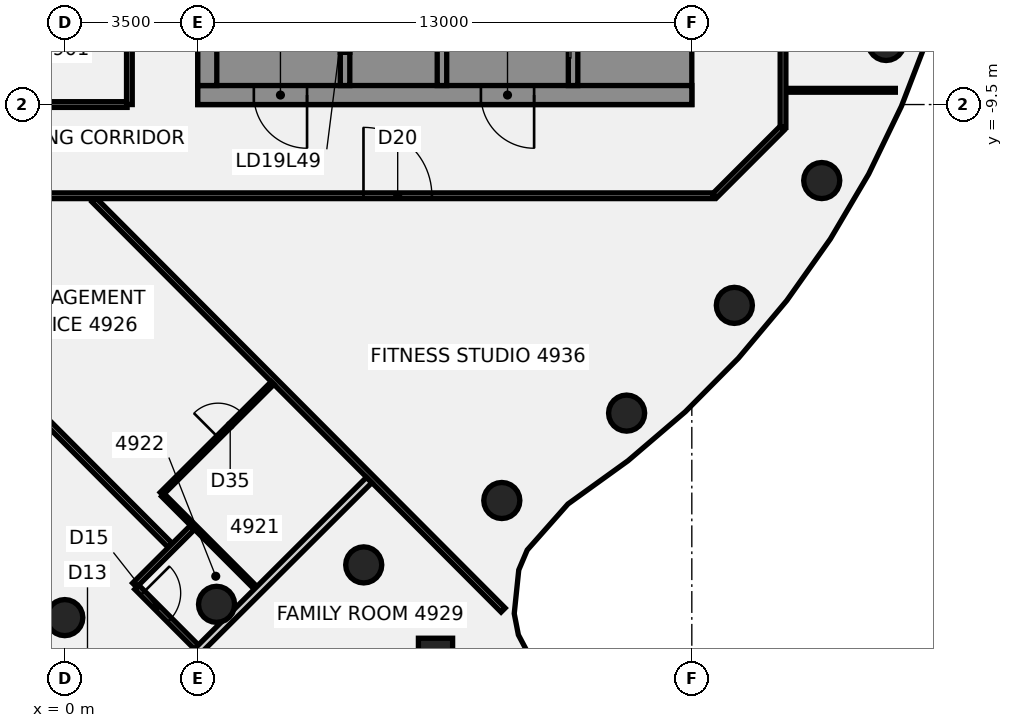
"""IFC4 building model, lengths in metres.
Left out: names, types, materials, properties, quantities, classifications, styles, units other than length and angle.
Written with IfcOpenShell. Run it as: python <this file> out.ifc"""

import sys

from ifc_helpers import new_model, si_unit, direction, frame, frame_2d, origin, origin_2d, place, context, subcontext, project, spatial, polyline, rectangle, circle, outline, extrude, element, fill, save


model = new_model("IFC4")
c1 = context("Model", 3, precision=1e-05, world=origin(), true_north=direction((0.0, 1.0)))
c2 = subcontext(c1, "Body", "Model", "MODEL_VIEW")
j1 = project(units=[si_unit("LENGTHUNIT", "METRE"), si_unit("PLANEANGLEUNIT", "RADIAN")], contexts=[c1])
p1 = place(None, origin())
s1 = spatial("IfcSite", under=j1, at=p1, CompositionType="ELEMENT")
p2 = place(p1, origin())
s2 = spatial("IfcBuilding", under=s1, at=p2, CompositionType="ELEMENT")
p3 = place(p2, frame((0.0, 0.0, 196.9)))
s3 = spatial("IfcBuildingStorey", under=s2, at=p3, CompositionType="ELEMENT", Elevation=196.9)
for number, where, z_axis, x_axis in (
    (1, (0.0, -23.0, -0.14), (0.0, 0.0, 1.0), (1.0, 0.0, 0.0)),
    (2, (3.994, -22.651, -0.14), (0.0, 0.0, 1.0), (1.0, 0.0, 0.0)),
    (3, (7.866, -21.613, -0.14), (0.0, 0.0, 1.0), (1.0, 0.0, 0.0)),
    (4, (11.5, -19.919, -0.14), (0.0, 0.0, 1.0), (1.0, 0.0, 0.0)),
    (5, (14.784, -17.619, -0.14), (0.0, 0.0, 1.0), (1.0, 0.0, 0.0)),
    (6, (17.619, -14.784, -0.14), (0.0, 0.0, 1.0), (1.0, 0.0, 0.0)),
    (7, (19.919, -11.5, -0.14), (0.0, 0.0, 1.0), (1.0, 0.0, 0.0)),
    (8, (21.613, -7.866, -0.14), (0.0, 0.0, 1.0), (1.0, 0.0, 0.0)),
):
    element("IfcColumn", number, at=place(p3, frame(where, z_axis=z_axis, x_axis=x_axis)), inside=s3, PredefinedType="COLUMN", context=c2, shape_type="SweptSolid", body=[
        extrude(circle(Radius=0.475, at=origin_2d()), origin(), (0.0, 0.0, 1.0), 3.6),
    ])
p4 = place(p3, frame((9.756, -23.992, -0.139), z_axis=(0.009624668379, 0.04947892899, 0.998728792688), x_axis=(-0.70765331906, -0.705324503584, 0.041762718624)))
e9 = element("IfcColumn", 9, at=p4, inside=s3, PredefinedType="COLUMN", context=c2, shape_type="SweptSolid", body=[
    extrude(rectangle(XDim=0.9, YDim=0.9, at=origin_2d()), origin(), (0.0, 0.0, 1.0), 3.602),
])
p5 = place(p3, frame((-6.292, -12.01, 0.0), z_axis=(0.0, 0.0, 1.0), x_axis=(0.70618374721, -0.708028611834, 0.0)))
e10 = element("IfcWall", 10, at=p5, inside=s3, PredefinedType="PARTITIONING", context=c2, shape_type="SweptSolid", body=[
    extrude(rectangle(XDim=12.836, YDim=0.15, at=frame_2d((6.418, 0.0))), origin(), (0.0, 0.0, 1.0), 2.864),
])
p6 = place(p5, frame((4.195, 0.0, 0.0)))
e11 = element("IfcOpeningElement", 11, at=p6, cuts=e10, PredefinedType="OPENING", context=c2, shape_type="SweptSolid", body=[
    extrude(rectangle(XDim=0.9, YDim=2.1, at=frame_2d((0.45, 1.05))), frame((0.0, 0.085, 0.0), z_axis=(0.0, -1.0, 0.0), x_axis=(1.0, 0.0, 0.0)), (0.0, 0.0, 1.0), 0.17),
])
p7 = place(p3, frame((0.77, -12.01, 0.0), z_axis=(0.0, 0.0, 1.0), x_axis=(0.706233281546, -0.70797920311, 0.0)))
e12 = element("IfcWall", 12, at=p7, inside=s3, PredefinedType="PARTITIONING", context=c2, shape_type="SweptSolid", body=[
    extrude(rectangle(XDim=15.242, YDim=0.15, at=frame_2d((7.621, 0.0))), origin(), (0.0, 0.0, 1.0), 2.864),
])
p8 = place(p3, frame((1.895, -22.201, 0.0), z_axis=(0.0, 0.0, 1.0), x_axis=(0.706276457416, -0.707936131088, 0.0)))
e13 = element("IfcWall", 13, at=p8, inside=s3, PredefinedType="PARTITIONING", context=c2, shape_type="SweptSolid", body=[
    extrude(rectangle(XDim=15.74, YDim=0.15, at=frame_2d((7.87, 0.0))), origin(), (0.0, 0.0, 1.0), 2.864),
])
p9 = place(p8, frame((0.22, 0.0, 0.0)))
e14 = element("IfcOpeningElement", 14, at=p9, cuts=e13, PredefinedType="OPENING", context=c2, shape_type="SweptSolid", body=[
    extrude(rectangle(XDim=1.0, YDim=2.1, at=frame_2d((0.5, 1.05))), frame((0.0, 0.085, 0.0), z_axis=(0.0, -1.0, 0.0), x_axis=(1.0, 0.0, 0.0)), (0.0, 0.0, 1.0), 0.17),
])
p10 = place(p8, frame((6.22, 0.0, 0.0)))
e15 = element("IfcOpeningElement", 15, at=p10, cuts=e13, PredefinedType="OPENING", context=c2, shape_type="SweptSolid", body=[
    extrude(rectangle(XDim=0.9, YDim=2.1, at=frame_2d((0.45, 1.05))), frame((0.0, 0.085, 0.0), z_axis=(0.0, -1.0, 0.0), x_axis=(1.0, 0.0, 0.0)), (0.0, 0.0, 1.0), 0.17),
])
p11 = place(p8, frame((14.271, 0.0, 0.0)))
e16 = element("IfcOpeningElement", 16, at=p11, cuts=e13, PredefinedType="OPENING", context=c2, shape_type="SweptSolid", body=[
    extrude(rectangle(XDim=0.9, YDim=2.1, at=frame_2d((0.45, 1.05))), frame((0.0, 0.085, 0.0), z_axis=(0.0, -1.0, 0.0), x_axis=(1.0, 0.0, 0.0)), (0.0, 0.0, 1.0), 0.17),
])
p12 = place(p3, frame((2.583, -19.776, 0.0), z_axis=(0.0, 0.0, 1.0), x_axis=(0.706682050028, -0.707531257379, 0.0)))
e17 = element("IfcWall", 17, at=p12, inside=s3, PredefinedType="PARTITIONING", context=c2, shape_type="SweptSolid", body=[
    extrude(rectangle(XDim=3.45, YDim=0.1, at=frame_2d((1.725, 0.0))), origin(), (0.0, 0.0, 1.0), 2.864),
])
p13 = place(p3, frame((-17.1, -11.9, 0.0), z_axis=(0.0, 0.0, 1.0), x_axis=(1.0, 0.0, 0.0)))
e18 = element("IfcWall", 18, at=p13, inside=s3, PredefinedType="PARTITIONING", context=c2, shape_type="SweptSolid", body=[
    extrude(rectangle(XDim=34.165, YDim=0.15, at=frame_2d((17.083, 0.0))), origin(), (0.0, 0.0, 1.0), 2.864),
])
p14 = place(p13, frame((8.152, 0.0, 0.0)))
e19 = element("IfcOpeningElement", 19, at=p14, cuts=e18, PredefinedType="OPENING", context=c2, shape_type="SweptSolid", body=[
    extrude(rectangle(XDim=1.8, YDim=2.1, at=frame_2d((0.9, 1.05))), frame((0.0, 0.085, 0.0), z_axis=(0.0, -1.0, 0.0), x_axis=(1.0, 0.0, 0.0)), (0.0, 0.0, 1.0), 0.17),
])
p15 = place(p13, frame((2.1, 0.0, 0.0)))
e20 = element("IfcOpeningElement", 20, at=p15, cuts=e18, PredefinedType="OPENING", context=c2, shape_type="SweptSolid", body=[
    extrude(rectangle(XDim=1.8, YDim=2.1, at=frame_2d((0.9, 1.05))), frame((0.0, 0.085, 0.0), z_axis=(0.0, -1.0, 0.0), x_axis=(1.0, 0.0, 0.0)), (0.0, 0.0, 1.0), 0.17),
])
p16 = place(p13, frame((24.96, 0.0, 0.0)))
e21 = element("IfcOpeningElement", 21, at=p16, cuts=e18, PredefinedType="OPENING", context=c2, shape_type="SweptSolid", body=[
    extrude(rectangle(XDim=1.8, YDim=2.1, at=frame_2d((0.9, 1.05))), frame((0.0, 0.085, 0.0), z_axis=(0.0, -1.0, 0.0), x_axis=(1.0, 0.0, 0.0)), (0.0, 0.0, 1.0), 0.17),
])
p17 = place(p3, frame((-1.64, -9.5, 0.0), z_axis=(0.0, 0.0, 1.0), x_axis=(1.0, 0.0, 0.0)))
e22 = element("IfcWall", 22, at=p17, inside=s3, PredefinedType="PARTITIONING", context=c2, shape_type="SweptSolid", body=[
    extrude(rectangle(XDim=3.28, YDim=0.15, at=frame_2d((1.64, 0.0))), origin(), (0.0, 0.0, 1.0), 2.864),
])
p18 = place(p3, frame((18.955, -9.125, 0.0), z_axis=(0.0, 0.0, 1.0), x_axis=(1.0, 0.0, 0.0)))
e23 = element("IfcWall", 23, at=p18, inside=s3, PredefinedType="PARTITIONING", context=c2, shape_type="SweptSolid", body=[
    extrude(rectangle(XDim=2.9, YDim=0.1, at=frame_2d((1.45, 0.0))), origin(), (0.0, 0.0, 1.0), 2.864),
])
p19 = place(p3, frame((2.548, -19.74, 0.0), z_axis=(0.0, 0.0, 1.0), x_axis=(0.707934704976, 0.706277886877, 0.0)))
e24 = element("IfcWall", 24, at=p19, inside=s3, PredefinedType="PARTITIONING", context=c2, shape_type="SweptSolid", body=[
    extrude(rectangle(XDim=4.126, YDim=0.1, at=frame_2d((2.063, 0.0))), origin(), (0.0, 0.0, 1.0), 2.864),
])
p20 = place(p19, frame((2.1, 0.0, 0.0)))
e25 = element("IfcOpeningElement", 25, at=p20, cuts=e24, PredefinedType="OPENING", context=c2, shape_type="SweptSolid", body=[
    extrude(rectangle(XDim=0.9, YDim=2.1, at=frame_2d((0.45, 1.05))), frame((0.0, 0.06, 0.0), z_axis=(0.0, -1.0, 0.0), x_axis=(1.0, 0.0, 0.0)), (0.0, 0.0, 1.0), 0.12),
])
p21 = place(p3, frame((-1.989, -29.351, 0.0), z_axis=(0.0, 0.0, 1.0), x_axis=(0.708014019558, 0.706198377305, 0.0)))
e26 = element("IfcWall", 26, at=p21, inside=s3, PredefinedType="PARTITIONING", context=c2, shape_type="SweptSolid", body=[
    extrude(rectangle(XDim=14.119, YDim=0.2, at=frame_2d((7.06, 0.0))), origin(), (0.0, 0.0, 1.0), 2.864),
])
p22 = place(p21, frame((5.699, 0.0, 0.0)))
e27 = element("IfcOpeningElement", 27, at=p22, cuts=e26, PredefinedType="OPENING", context=c2, shape_type="SweptSolid", body=[
    extrude(rectangle(XDim=1.4, YDim=2.1, at=frame_2d((0.7, 1.05))), frame((0.0, 0.11, 0.0), z_axis=(0.0, -1.0, 0.0), x_axis=(1.0, 0.0, 0.0)), (0.0, 0.0, 1.0), 0.22),
])
p23 = place(p21, frame((1.579, 0.0, 0.0)))
e28 = element("IfcOpeningElement", 28, at=p23, cuts=e26, PredefinedType="OPENING", context=c2, shape_type="SweptSolid", body=[
    extrude(rectangle(XDim=0.9, YDim=2.1, at=frame_2d((0.45, 1.05))), frame((0.0, 0.11, 0.0), z_axis=(0.0, -1.0, 0.0), x_axis=(1.0, 0.0, 0.0)), (0.0, 0.0, 1.0), 0.22),
])
p24 = place(p3, frame((1.839, -22.145, 0.0), z_axis=(0.0, 0.0, 1.0), x_axis=(0.708189507156, 0.706022394797, 0.0)))
e29 = element("IfcWall", 29, at=p24, inside=s3, PredefinedType="PARTITIONING", context=c2, shape_type="SweptSolid", body=[
    extrude(rectangle(XDim=2.14, YDim=0.15, at=frame_2d((1.07, 0.0))), origin(), (0.0, 0.0, 1.0), 2.864),
])
p25 = place(p3, frame((17.1, -11.9, 0.0), z_axis=(0.0, 0.0, 1.0), x_axis=(0.707106781187, 0.707106781187, 0.0)))
e30 = element("IfcWall", 30, at=p25, inside=s3, PredefinedType="PARTITIONING", context=c2, shape_type="SweptSolid", body=[
    extrude(rectangle(XDim=2.505, YDim=0.15, at=frame_2d((1.253, 0.0))), origin(), (0.0, 0.0, 1.0), 2.864),
])
p26 = place(p3, frame((1.7, -9.5, 0.0), z_axis=(0.0, 0.0, 1.0), x_axis=(0.0, 1.0, 0.0)))
e31 = element("IfcWall", 31, at=p26, inside=s3, PredefinedType="PARTITIONING", context=c2, shape_type="SweptSolid", body=[
    extrude(rectangle(XDim=19.0, YDim=0.15, at=frame_2d((9.5, 0.0))), origin(), (0.0, 0.0, 1.0), 2.864),
])
p27 = place(p3, frame((18.9, -10.1, 0.0), z_axis=(0.0, 0.0, 1.0), x_axis=(0.0, 1.0, 0.0)))
e32 = element("IfcWall", 32, at=p27, inside=s3, PredefinedType="PARTITIONING", context=c2, shape_type="SweptSolid", body=[
    extrude(rectangle(XDim=20.82, YDim=0.15, at=frame_2d((10.41, 0.0))), origin(), (0.0, 0.0, 1.0), 2.864),
])
p28 = place(p27, frame((18.72, 0.0, 0.0)))
e33 = element("IfcOpeningElement", 33, at=p28, cuts=e32, PredefinedType="OPENING", context=c2, shape_type="SweptSolid", body=[
    extrude(rectangle(XDim=0.9, YDim=2.1, at=frame_2d((0.45, 1.05))), frame((0.0, 0.085, 0.0), z_axis=(0.0, -1.0, 0.0), x_axis=(1.0, 0.0, 0.0)), (0.0, 0.0, 1.0), 0.17),
])
p29 = place(p27, frame((10.725, 0.0, 0.0)))
e34 = element("IfcOpeningElement", 34, at=p29, cuts=e32, PredefinedType="OPENING", context=c2, shape_type="SweptSolid", body=[
    extrude(rectangle(XDim=1.8, YDim=2.1, at=frame_2d((0.9, 1.05))), frame((0.0, 0.085, 0.0), z_axis=(0.0, -1.0, 0.0), x_axis=(1.0, 0.0, 0.0)), (0.0, 0.0, 1.0), 0.17),
])
p30 = place(p27, frame((6.975, 0.0, 0.0)))
e35 = element("IfcOpeningElement", 35, at=p30, cuts=e32, PredefinedType="OPENING", context=c2, shape_type="SweptSolid", body=[
    extrude(rectangle(XDim=1.8, YDim=2.1, at=frame_2d((0.9, 1.05))), frame((0.0, 0.085, 0.0), z_axis=(0.0, -1.0, 0.0), x_axis=(1.0, 0.0, 0.0)), (0.0, 0.0, 1.0), 0.17),
])
p31 = place(p3, frame((16.5, -9.25, 0.0), z_axis=(0.0, 0.0, 1.0), x_axis=(-1.0, 0.0, 0.0)))
e36 = element("IfcWall", 36, at=p31, inside=s3, PredefinedType="SHEAR", context=c2, shape_type="SweptSolid", body=[
    extrude(rectangle(XDim=13.0, YDim=0.5, at=frame_2d((6.5, 0.0))), origin(), (0.0, 0.0, 1.0), 3.46),
])
p32 = place(p31, frame((4.15, 0.0, 0.0)))
e37 = element("IfcOpeningElement", 37, at=p32, cuts=e36, PredefinedType="OPENING", context=c2, shape_type="SweptSolid", body=[
    extrude(rectangle(XDim=1.4, YDim=2.1, at=frame_2d((0.7, 1.05))), frame((0.0, 0.26, 0.0), z_axis=(0.0, -1.0, 0.0), x_axis=(1.0, 0.0, 0.0)), (0.0, 0.0, 1.0), 0.52),
])
p33 = place(p31, frame((10.125, 0.0, 0.0)))
e38 = element("IfcOpeningElement", 38, at=p33, cuts=e36, PredefinedType="OPENING", context=c2, shape_type="SweptSolid", body=[
    extrude(rectangle(XDim=1.4, YDim=2.1, at=frame_2d((0.7, 1.05))), frame((0.0, 0.26, 0.0), z_axis=(0.0, -1.0, 0.0), x_axis=(1.0, 0.0, 0.0)), (0.0, 0.0, 1.0), 0.52),
])
p34 = place(p3, origin())
e39 = element("IfcWall", 39, at=p34, inside=s3, PredefinedType="SHEAR", context=c2, shape_type="SweptSolid", body=[
    extrude(outline(polyline([(13.5, -8.125), (13.5, -9.0), (16.0, -9.0), (16.5, -9.0), (16.5, 9.0), (16.0, 9.0), (13.5, 9.0), (13.5, 8.125), (16.0, 8.125), (16.0, 5.625), (13.5, 5.625), (13.5, 5.375), (16.0, 5.375), (16.0, -5.375), (13.5, -5.375), (13.5, -5.625), (16.0, -5.625), (16.0, -8.125), (13.5, -8.125)])), origin(), (0.0, 0.0, 1.0), 3.46),
])
p35 = place(p3, origin())
e40 = element("IfcWall", 40, at=p35, inside=s3, PredefinedType="SHEAR", context=c2, shape_type="SweptSolid", body=[
    extrude(outline(polyline([(7.5, -8.125), (7.5, -9.0), (9.8, -9.0), (9.8, -8.125), (9.8, -5.625), (9.55, -5.625), (9.55, -8.125), (7.5, -8.125)])), origin(), (0.0, 0.0, 1.0), 3.46),
])
p36 = place(p3, frame((7.375, -9.0, 0.0), z_axis=(0.0, 0.0, 1.0), x_axis=(0.0, 1.0, 0.0)))
e41 = element("IfcWall", 41, at=p36, inside=s3, PredefinedType="SHEAR", context=c2, shape_type="SweptSolid", body=[
    extrude(rectangle(XDim=0.875, YDim=0.25, at=frame_2d((0.438, 0.0))), origin(), (0.0, 0.0, 1.0), 3.46),
])
p37 = place(p3, frame((13.375, -9.0, 0.0), z_axis=(0.0, 0.0, 1.0), x_axis=(0.0, 1.0, 0.0)))
e42 = element("IfcWall", 42, at=p37, inside=s3, PredefinedType="SHEAR", context=c2, shape_type="SweptSolid", body=[
    extrude(rectangle(XDim=18.0, YDim=0.25, at=frame_2d((9.0, 0.0))), origin(), (0.0, 0.0, 1.0), 3.46),
])
p38 = place(p37, frame((1.425, 0.0, 0.0)))
e43 = element("IfcOpeningElement", 43, at=p38, cuts=e42, PredefinedType="OPENING", context=c2, shape_type="SweptSolid", body=[
    extrude(rectangle(XDim=1.4, YDim=2.1, at=frame_2d((0.7, 1.05))), frame((0.0, 0.135, 0.0), z_axis=(0.0, -1.0, 0.0), x_axis=(1.0, 0.0, 0.0)), (0.0, 0.0, 1.0), 0.27),
])
p39 = place(p37, frame((4.854, 0.0, 0.0)))
e44 = element("IfcOpeningElement", 44, at=p39, cuts=e42, PredefinedType="OPENING", context=c2, shape_type="SweptSolid", body=[
    extrude(rectangle(XDim=1.0, YDim=2.1, at=frame_2d((0.5, 1.05))), frame((0.0, 0.135, 0.0), z_axis=(0.0, -1.0, 0.0), x_axis=(1.0, 0.0, 0.0)), (0.0, 0.0, 1.0), 0.27),
])
p40 = place(p37, frame((10.354, 0.0, 0.0)))
e45 = element("IfcOpeningElement", 45, at=p40, cuts=e42, PredefinedType="OPENING", context=c2, shape_type="SweptSolid", body=[
    extrude(rectangle(XDim=1.0, YDim=2.1, at=frame_2d((0.5, 1.05))), frame((0.0, 0.135, 0.0), z_axis=(0.0, -1.0, 0.0), x_axis=(1.0, 0.0, 0.0)), (0.0, 0.0, 1.0), 0.27),
])
p41 = place(p3, frame((9.925, -9.0, 0.0), z_axis=(0.0, 0.0, 1.0), x_axis=(0.0, 1.0, 0.0)))
e46 = element("IfcWall", 46, at=p41, inside=s3, PredefinedType="SHEAR", context=c2, shape_type="SweptSolid", body=[
    extrude(rectangle(XDim=18.0, YDim=0.25, at=frame_2d((9.0, 0.0))), origin(), (0.0, 0.0, 1.0), 3.46),
])
p42 = place(p41, frame((4.275, 0.0, 0.0)))
e47 = element("IfcOpeningElement", 47, at=p42, cuts=e46, PredefinedType="OPENING", context=c2, shape_type="SweptSolid", body=[
    extrude(rectangle(XDim=1.2, YDim=2.1, at=frame_2d((0.6, 1.05))), frame((0.0, 0.135, 0.0), z_axis=(0.0, -1.0, 0.0), x_axis=(1.0, 0.0, 0.0)), (0.0, 0.0, 1.0), 0.27),
])
p43 = place(p41, frame((7.025, 0.0, 0.0)))
e48 = element("IfcOpeningElement", 48, at=p43, cuts=e46, PredefinedType="OPENING", context=c2, shape_type="SweptSolid", body=[
    extrude(rectangle(XDim=1.2, YDim=2.1, at=frame_2d((0.6, 1.05))), frame((0.0, 0.135, 0.0), z_axis=(0.0, -1.0, 0.0), x_axis=(1.0, 0.0, 0.0)), (0.0, 0.0, 1.0), 0.27),
])
p44 = place(p41, frame((9.825, 0.0, 0.0)))
e49 = element("IfcOpeningElement", 49, at=p44, cuts=e46, PredefinedType="OPENING", context=c2, shape_type="SweptSolid", body=[
    extrude(rectangle(XDim=1.1, YDim=2.1, at=frame_2d((0.55, 1.05))), frame((0.0, 0.135, 0.0), z_axis=(0.0, -1.0, 0.0), x_axis=(1.0, 0.0, 0.0)), (0.0, 0.0, 1.0), 0.27),
])
p45 = place(p3, frame((3.75, -9.0, 0.0), z_axis=(0.0, 0.0, 1.0), x_axis=(0.0, 1.0, 0.0)))
e50 = element("IfcWall", 50, at=p45, inside=s3, PredefinedType="SHEAR", context=c2, shape_type="SweptSolid", body=[
    extrude(rectangle(XDim=18.0, YDim=0.5, at=frame_2d((9.0, 0.0))), origin(), (0.0, 0.0, 1.0), 3.46),
])
p46 = place(p45, frame((1.35, 0.0, 0.0)))
e51 = element("IfcOpeningElement", 51, at=p46, cuts=e50, PredefinedType="OPENING", context=c2, shape_type="SweptSolid", body=[
    extrude(rectangle(XDim=1.8, YDim=2.1, at=frame_2d((0.9, 1.05))), frame((0.0, 0.26, 0.0), z_axis=(0.0, -1.0, 0.0), x_axis=(1.0, 0.0, 0.0)), (0.0, 0.0, 1.0), 0.52),
])
p47 = place(p45, frame((12.478, 0.0, 0.0)))
e52 = element("IfcOpeningElement", 52, at=p47, cuts=e50, PredefinedType="OPENING", context=c2, shape_type="SweptSolid", body=[
    extrude(rectangle(XDim=1.0, YDim=2.1, at=frame_2d((0.5, 1.05))), frame((0.0, 0.26, 0.0), z_axis=(0.0, -1.0, 0.0), x_axis=(1.0, 0.0, 0.0)), (0.0, 0.0, 1.0), 0.52),
])
p48 = place(p45, frame((16.002, 0.0, 0.0)))
e53 = element("IfcOpeningElement", 53, at=p48, cuts=e50, PredefinedType="OPENING", context=c2, shape_type="SweptSolid", body=[
    extrude(rectangle(XDim=1.0, YDim=2.1, at=frame_2d((0.5, 1.05))), frame((0.0, 0.26, 0.0), z_axis=(0.0, -1.0, 0.0), x_axis=(1.0, 0.0, 0.0)), (0.0, 0.0, 1.0), 0.52),
])
p49 = place(p9, origin())
e54 = element("IfcDoor", 54, at=p49, inside=s3, OperationType="SINGLE_SWING_RIGHT", PredefinedType="DOOR", context=c2, shape_type="SweptSolid", body=[
    extrude(rectangle(XDim=1.0, YDim=2.1, at=frame_2d((0.5, 1.05))), frame((0.0, 0.025, 0.0), z_axis=(0.0, -1.0, 0.0), x_axis=(1.0, 0.0, 0.0)), (0.0, 0.0, 1.0), 0.05),
])
fill(e14, e54)
p50 = place(p16, frame((1.8, 0.0, 0.0), z_axis=(0.0, 0.0, 1.0), x_axis=(-1.0, 0.0, 0.0)))
e55 = element("IfcDoor", 55, at=p50, inside=s3, OperationType="DOUBLE_DOOR_SINGLE_SWING", PredefinedType="DOOR", context=c2, shape_type="SweptSolid", body=[
    extrude(rectangle(XDim=1.8, YDim=2.1, at=frame_2d((0.9, 1.05))), frame((0.0, 0.025, 0.0), z_axis=(0.0, -1.0, 0.0), x_axis=(1.0, 0.0, 0.0)), (0.0, 0.0, 1.0), 0.05),
])
fill(e21, e55)
p51 = place(p20, frame((0.9, 0.0, 0.0), z_axis=(0.0, 0.0, 1.0), x_axis=(-1.0, 0.0, 0.0)))
e56 = element("IfcDoor", 56, at=p51, inside=s3, OperationType="SINGLE_SWING_RIGHT", PredefinedType="DOOR", context=c2, shape_type="SweptSolid", body=[
    extrude(rectangle(XDim=0.9, YDim=2.1, at=frame_2d((0.45, 1.05))), frame((0.0, 0.025, 0.0), z_axis=(0.0, -1.0, 0.0), x_axis=(1.0, 0.0, 0.0)), (0.0, 0.0, 1.0), 0.05),
])
fill(e25, e56)
p52 = place(p32, origin())
e57 = element("IfcDoor", 57, at=p52, inside=s3, OperationType="SINGLE_SWING_LEFT", PredefinedType="DOOR", context=c2, shape_type="SweptSolid", body=[
    extrude(rectangle(XDim=1.4, YDim=2.1, at=frame_2d((0.7, 1.05))), frame((0.0, 0.025, 0.0), z_axis=(0.0, -1.0, 0.0), x_axis=(1.0, 0.0, 0.0)), (0.0, 0.0, 1.0), 0.05),
])
fill(e37, e57)
p53 = place(p33, origin())
e58 = element("IfcDoor", 58, at=p53, inside=s3, OperationType="SINGLE_SWING_LEFT", PredefinedType="DOOR", context=c2, shape_type="SweptSolid", body=[
    extrude(rectangle(XDim=1.4, YDim=2.1, at=frame_2d((0.7, 1.05))), frame((0.0, 0.025, 0.0), z_axis=(0.0, -1.0, 0.0), x_axis=(1.0, 0.0, 0.0)), (0.0, 0.0, 1.0), 0.05),
])
fill(e38, e58)
save(model, sys.argv[1])
